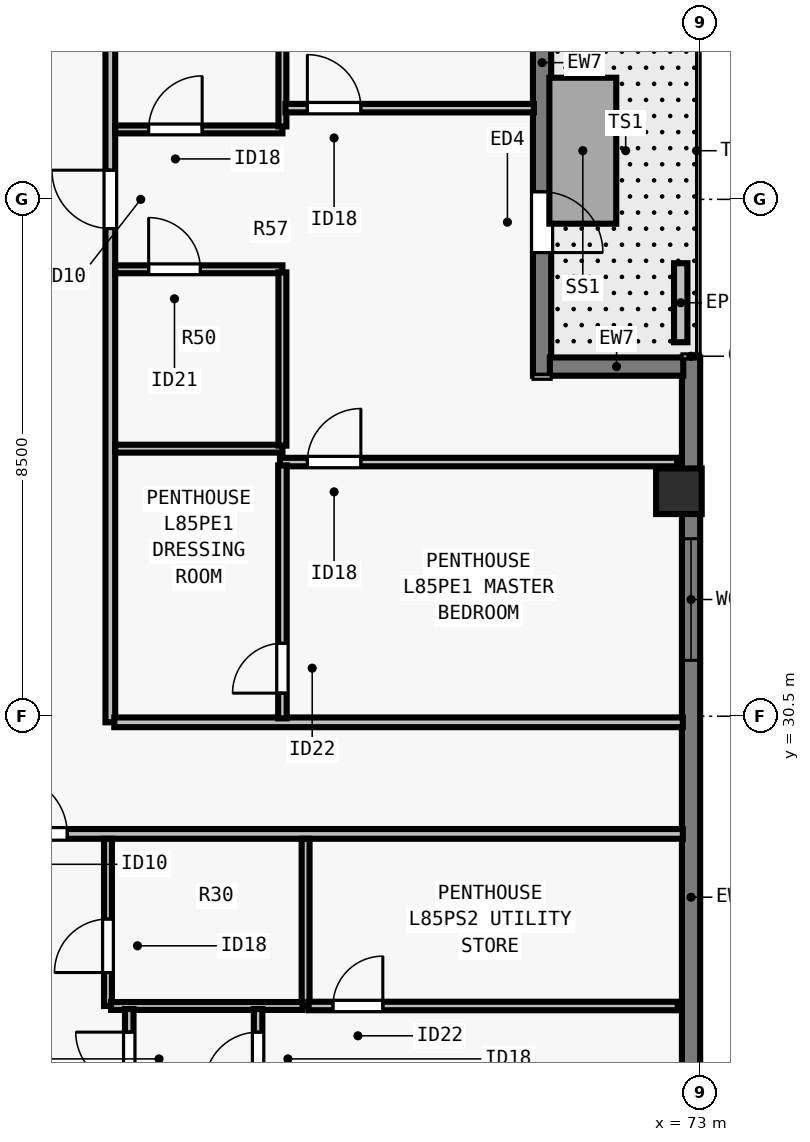
"""IFC4 building model, lengths in metres.
Left out: names, types, materials, properties, quantities, classifications, styles, units other than length and angle.
Written with IfcOpenShell. Run it as: python <this file> out.ifc"""

import sys

from ifc_helpers import new_model, si_unit, direction, frame, frame_2d, origin, origin_2d, place, context, subcontext, project, spatial, rectangle, extrude, element, fill, save


model = new_model("IFC4")
c1 = context("Model", 3, precision=1e-05, world=origin(), true_north=direction((0.0, 1.0)))
c2 = subcontext(c1, "Body", "Model", "MODEL_VIEW")
j1 = project(units=[si_unit("LENGTHUNIT", "METRE"), si_unit("PLANEANGLEUNIT", "RADIAN")], contexts=[c1])
p1 = place(None, origin())
s1 = spatial("IfcSite", under=j1, at=p1, CompositionType="ELEMENT")
p2 = place(p1, origin())
s2 = spatial("IfcBuilding", under=s1, at=p2, CompositionType="ELEMENT")
p3 = place(p2, frame((0.0, 0.0, 308.5)))
s3 = spatial("IfcBuildingStorey", under=s2, at=p3, CompositionType="ELEMENT", Elevation=308.5)
p4 = place(p3, frame((72.65, 34.2, 0.0), z_axis=(0.0, 0.0, 1.0), x_axis=(0.0, 1.0, 0.0)))
e1 = element("IfcColumn", 1, at=p4, inside=s3, PredefinedType="COLUMN", context=c2, shape_type="SweptSolid", body=[
    extrude(rectangle(XDim=0.75, YDim=0.75, at=origin_2d()), origin(), (0.0, 0.0, 1.0), 3.5),
])
p5 = place(p3, frame((72.85, 36.4, 0.0), z_axis=(0.0, 0.0, 1.0), x_axis=(0.0, -1.0, 0.0)))
e2 = element("IfcWall", 2, at=p5, inside=s3, PredefinedType="SOLIDWALL", context=c2, shape_type="SweptSolid", body=[
    extrude(rectangle(XDim=12.622, YDim=0.3, at=frame_2d((6.311, 0.0))), origin(), (0.0, 0.0, 1.0), 3.29),
])
p6 = place(p5, frame((2.98, 0.0, 0.8)))
e3 = element("IfcOpeningElement", 3, at=p6, cuts=e2, PredefinedType="OPENING", context=c2, shape_type="SweptSolid", body=[
    extrude(rectangle(XDim=2.0, YDim=1.758, at=frame_2d((1.0, 0.879))), frame((0.0, 0.16, 0.0), z_axis=(0.0, -1.0, 0.0), x_axis=(1.0, 0.0, 0.0)), (0.0, 0.0, 1.0), 0.32),
])
p7 = place(p3, frame((70.4, 43.222, 0.0), z_axis=(0.0, 0.0, 1.0), x_axis=(0.0, -1.0, 0.0)))
e4 = element("IfcWall", 4, at=p7, inside=s3, PredefinedType="SOLIDWALL", context=c2, shape_type="SweptSolid", body=[
    extrude(rectangle(XDim=7.122, YDim=0.3, at=frame_2d((3.561, 0.0))), origin(), (0.0, 0.0, 1.0), 3.29),
])
p8 = place(p7, frame((4.097, 0.0, 0.0)))
e5 = element("IfcOpeningElement", 5, at=p8, cuts=e4, PredefinedType="OPENING", context=c2, shape_type="SweptSolid", body=[
    extrude(rectangle(XDim=1.0, YDim=2.15, at=frame_2d((0.5, 1.075))), frame((0.0, 0.16, 0.0), z_axis=(0.0, -1.0, 0.0), x_axis=(1.0, 0.0, 0.0)), (0.0, 0.0, 1.0), 0.32),
])
p9 = place(p3, frame((70.528, 36.25, 0.0), z_axis=(0.0, 0.0, 1.0), x_axis=(1.0, 0.0, 0.0)))
e6 = element("IfcWall", 6, at=p9, inside=s3, PredefinedType="SOLIDWALL", context=c2, shape_type="SweptSolid", body=[
    extrude(rectangle(XDim=2.194, YDim=0.3, at=frame_2d((1.097, 0.0))), origin(), (0.0, 0.0, 1.0), 3.29),
])
p10 = place(p3, frame((72.68, 36.65, 0.0), z_axis=(0.0, 0.0, 1.0), x_axis=(0.0, 1.0, 0.0)))
e7 = element("IfcWall", 7, at=p10, inside=s3, PredefinedType="PARAPET", context=c2, shape_type="SweptSolid", body=[
    extrude(rectangle(XDim=1.3, YDim=0.22, at=frame_2d((0.65, 0.0))), origin(), (0.0, 0.0, 1.0), 0.55),
])
p11 = place(p3, frame((31.285, 28.565, 0.0), z_axis=(0.0, 0.0, 1.0), x_axis=(1.0, 0.0, 0.0)))
e8 = element("IfcWall", 8, at=p11, inside=s3, PredefinedType="PARTITIONING", context=c2, shape_type="SweptSolid", body=[
    extrude(rectangle(XDim=41.43, YDim=0.16, at=frame_2d((20.715, 0.0))), origin(), (0.0, 0.0, 1.0), 3.009),
])
p12 = place(p11, frame((9.766, 0.0, 0.0)))
e9 = element("IfcOpeningElement", 9, at=p12, cuts=e8, PredefinedType="OPENING", context=c2, shape_type="SweptSolid", body=[
    extrude(rectangle(XDim=0.96, YDim=2.18, at=frame_2d((0.48, 1.09))), frame((0.0, 0.09, 0.0), z_axis=(0.0, -1.0, 0.0), x_axis=(1.0, 0.0, 0.0)), (0.0, 0.0, 1.0), 0.18),
])
p13 = place(p11, frame((30.346, 0.0, 0.0)))
e10 = element("IfcOpeningElement", 10, at=p13, cuts=e8, PredefinedType="OPENING", context=c2, shape_type="SweptSolid", body=[
    extrude(rectangle(XDim=0.96, YDim=2.18, at=frame_2d((0.48, 1.09))), frame((0.0, 0.09, 0.0), z_axis=(0.0, -1.0, 0.0), x_axis=(1.0, 0.0, 0.0)), (0.0, 0.0, 1.0), 0.18),
])
p14 = place(p3, frame((63.3, 30.4, 0.0), z_axis=(0.0, 0.0, 1.0), x_axis=(0.0, 1.0, 0.0)))
e11 = element("IfcWall", 11, at=p14, inside=s3, PredefinedType="PARTITIONING", context=c2, shape_type="SweptSolid", body=[
    extrude(rectangle(XDim=17.2, YDim=0.16, at=frame_2d((8.6, 0.0))), origin(), (0.0, 0.0, 1.0), 3.29),
])
p15 = place(p14, frame((8.12, 0.0, 0.0)))
e12 = element("IfcOpeningElement", 12, at=p15, cuts=e11, PredefinedType="OPENING", context=c2, shape_type="SweptSolid", body=[
    extrude(rectangle(XDim=0.96, YDim=2.18, at=frame_2d((0.48, 1.09))), frame((0.0, 0.09, 0.0), z_axis=(0.0, -1.0, 0.0), x_axis=(1.0, 0.0, 0.0)), (0.0, 0.0, 1.0), 0.18),
])
p16 = place(p3, frame((63.365, 30.4, 0.0), z_axis=(0.0, 0.0, 1.0), x_axis=(1.0, 0.0, 0.0)))
e13 = element("IfcWall", 13, at=p16, inside=s3, PredefinedType="PARTITIONING", context=c2, shape_type="SweptSolid", body=[
    extrude(rectangle(XDim=9.35, YDim=0.16, at=frame_2d((4.675, 0.0))), origin(), (0.0, 0.0, 1.0), 3.29),
])
p17 = place(p3, frame((66.511, 25.735, 0.0), z_axis=(0.0, 0.0, 1.0), x_axis=(0.0, 1.0, 0.0)))
e14 = element("IfcWall", 14, at=p17, inside=s3, PredefinedType="PLUMBINGWALL", context=c2, shape_type="SweptSolid", body=[
    extrude(rectangle(XDim=2.75, YDim=0.13, at=frame_2d((1.375, 0.0))), origin(), (0.0, 0.0, 1.0), 3.29),
])
p18 = place(p3, frame((63.261, 25.735, 0.0), z_axis=(0.0, 0.0, 1.0), x_axis=(0.0, 1.0, 0.0)))
e15 = element("IfcWall", 15, at=p18, inside=s3, PredefinedType="PLUMBINGWALL", context=c2, shape_type="SweptSolid", body=[
    extrude(rectangle(XDim=2.75, YDim=0.13, at=frame_2d((1.375, 0.0))), origin(), (0.0, 0.0, 1.0), 3.29),
])
p19 = place(p18, frame((0.55, 0.0, 0.0)))
e16 = element("IfcOpeningElement", 16, at=p19, cuts=e15, PredefinedType="OPENING", context=c2, shape_type="SweptSolid", body=[
    extrude(rectangle(XDim=0.88, YDim=2.1, at=frame_2d((0.44, 1.05))), frame((0.0, 0.075, 0.0), z_axis=(0.0, -1.0, 0.0), x_axis=(1.0, 0.0, 0.0)), (0.0, 0.0, 1.0), 0.15),
])
p20 = place(p3, frame((63.311, 25.735, 0.0), z_axis=(0.0, 0.0, 1.0), x_axis=(1.0, 0.0, 0.0)))
e17 = element("IfcWall", 17, at=p20, inside=s3, PredefinedType="PLUMBINGWALL", context=c2, shape_type="SweptSolid", body=[
    extrude(rectangle(XDim=3.15, YDim=0.13, at=frame_2d((1.575, 0.0))), origin(), (0.0, 0.0, 1.0), 3.29),
])
p21 = place(p3, frame((65.73, 18.38, 0.0), z_axis=(0.0, 0.0, 1.0), x_axis=(0.0, 1.0, 0.0)))
e18 = element("IfcWall", 18, at=p21, inside=s3, PredefinedType="PARTITIONING", context=c2, shape_type="SweptSolid", body=[
    extrude(rectangle(XDim=7.305, YDim=0.14, at=frame_2d((3.653, 0.0))), origin(), (0.0, 0.0, 1.0), 2.653),
])
p22 = place(p21, frame((6.045, 0.0, 0.0)))
e19 = element("IfcOpeningElement", 19, at=p22, cuts=e18, PredefinedType="OPENING", context=c2, shape_type="SweptSolid", body=[
    extrude(rectangle(XDim=0.88, YDim=2.1, at=frame_2d((0.44, 1.05))), frame((0.0, 0.08, 0.0), z_axis=(0.0, -1.0, 0.0), x_axis=(1.0, 0.0, 0.0)), (0.0, 0.0, 1.0), 0.16),
])
p23 = place(p3, frame((66.561, 25.735, 0.0), z_axis=(0.0, 0.0, 1.0), x_axis=(1.0, 0.0, 0.0)))
e20 = element("IfcWall", 20, at=p23, inside=s3, PredefinedType="PARTITIONING", context=c2, shape_type="SweptSolid", body=[
    extrude(rectangle(XDim=6.069, YDim=0.14, at=frame_2d((3.034, 0.0))), origin(), (0.0, 0.0, 1.0), 3.009),
])
p24 = place(p23, frame((0.4, 0.0, 0.0)))
e21 = element("IfcOpeningElement", 21, at=p24, cuts=e20, PredefinedType="OPENING", context=c2, shape_type="SweptSolid", body=[
    extrude(rectangle(XDim=0.82, YDim=2.1, at=frame_2d((0.41, 1.05))), frame((0.0, 0.08, 0.0), z_axis=(0.0, -1.0, 0.0), x_axis=(1.0, 0.0, 0.0)), (0.0, 0.0, 1.0), 0.16),
])
p25 = place(p3, frame((63.611, 18.38, 0.0), z_axis=(0.0, 0.0, 1.0), x_axis=(0.0, 1.0, 0.0)))
e22 = element("IfcWall", 22, at=p25, inside=s3, PredefinedType="PARTITIONING", context=c2, shape_type="SweptSolid", body=[
    extrude(rectangle(XDim=7.305, YDim=0.14, at=frame_2d((3.653, 0.0))), origin(), (0.0, 0.0, 1.0), 2.653),
])
p26 = place(p25, frame((6.045, 0.0, 0.0)))
e23 = element("IfcOpeningElement", 23, at=p26, cuts=e22, PredefinedType="OPENING", context=c2, shape_type="SweptSolid", body=[
    extrude(rectangle(XDim=0.88, YDim=2.1, at=frame_2d((0.44, 1.05))), frame((0.0, 0.08, 0.0), z_axis=(0.0, -1.0, 0.0), x_axis=(1.0, 0.0, 0.0)), (0.0, 0.0, 1.0), 0.16),
])
p27 = place(p3, frame((63.38, 34.9, 0.0), z_axis=(0.0, 0.0, 1.0), x_axis=(1.0, 0.0, 0.0)))
e24 = element("IfcWall", 24, at=p27, inside=s3, PredefinedType="PLUMBINGWALL", context=c2, shape_type="SweptSolid", body=[
    extrude(rectangle(XDim=2.75, YDim=0.13, at=frame_2d((1.375, 0.0))), origin(), (0.0, 0.0, 1.0), 3.29),
])
p28 = place(p3, frame((63.38, 37.85, 0.0), z_axis=(0.0, 0.0, 1.0), x_axis=(1.0, 0.0, 0.0)))
e25 = element("IfcWall", 25, at=p28, inside=s3, PredefinedType="PLUMBINGWALL", context=c2, shape_type="SweptSolid", body=[
    extrude(rectangle(XDim=2.75, YDim=0.13, at=frame_2d((1.375, 0.0))), origin(), (0.0, 0.0, 1.0), 3.29),
])
p29 = place(p28, frame((0.55, 0.0, 0.0)))
e26 = element("IfcOpeningElement", 26, at=p29, cuts=e25, PredefinedType="OPENING", context=c2, shape_type="SweptSolid", body=[
    extrude(rectangle(XDim=0.85, YDim=2.08, at=frame_2d((0.425, 1.04))), frame((0.0, 0.075, 0.0), z_axis=(0.0, -1.0, 0.0), x_axis=(1.0, 0.0, 0.0)), (0.0, 0.0, 1.0), 0.15),
])
p30 = place(p3, frame((66.13, 34.95, 0.0), z_axis=(0.0, 0.0, 1.0), x_axis=(0.0, 1.0, 0.0)))
e27 = element("IfcWall", 27, at=p30, inside=s3, PredefinedType="PLUMBINGWALL", context=c2, shape_type="SweptSolid", body=[
    extrude(rectangle(XDim=2.85, YDim=0.13, at=frame_2d((1.425, 0.0))), origin(), (0.0, 0.0, 1.0), 3.29),
])
p31 = place(p3, frame((63.38, 40.15, 0.0), z_axis=(0.0, 0.0, 1.0), x_axis=(1.0, 0.0, 0.0)))
e28 = element("IfcWall", 28, at=p31, inside=s3, PredefinedType="PLUMBINGWALL", context=c2, shape_type="SweptSolid", body=[
    extrude(rectangle(XDim=2.75, YDim=0.13, at=frame_2d((1.375, 0.0))), origin(), (0.0, 0.0, 1.0), 3.29),
])
p32 = place(p31, frame((0.55, 0.0, 0.0)))
e29 = element("IfcOpeningElement", 29, at=p32, cuts=e28, PredefinedType="OPENING", context=c2, shape_type="SweptSolid", body=[
    extrude(rectangle(XDim=0.88, YDim=2.1, at=frame_2d((0.44, 1.05))), frame((0.0, 0.075, 0.0), z_axis=(0.0, -1.0, 0.0), x_axis=(1.0, 0.0, 0.0)), (0.0, 0.0, 1.0), 0.15),
])
p33 = place(p3, frame((66.13, 40.2, 0.0), z_axis=(0.0, 0.0, 1.0), x_axis=(0.0, 1.0, 0.0)))
e30 = element("IfcWall", 30, at=p33, inside=s3, PredefinedType="PLUMBINGWALL", context=c2, shape_type="SweptSolid", body=[
    extrude(rectangle(XDim=3.15, YDim=0.13, at=frame_2d((1.575, 0.0))), origin(), (0.0, 0.0, 1.0), 3.29),
])
p34 = place(p3, frame((66.09, 34.68, 0.0), z_axis=(0.0, 0.0, 1.0), x_axis=(1.0, 0.0, 0.0)))
e31 = element("IfcWall", 31, at=p34, inside=s3, PredefinedType="PARTITIONING", context=c2, shape_type="SweptSolid", body=[
    extrude(rectangle(XDim=6.53, YDim=0.14, at=frame_2d((3.265, 0.0))), origin(), (0.0, 0.0, 1.0), 3.29),
])
p35 = place(p34, frame((0.45, 0.0, 0.0)))
e32 = element("IfcOpeningElement", 32, at=p35, cuts=e31, PredefinedType="OPENING", context=c2, shape_type="SweptSolid", body=[
    extrude(rectangle(XDim=0.88, YDim=2.1, at=frame_2d((0.44, 1.05))), frame((0.0, 0.08, 0.0), z_axis=(0.0, -1.0, 0.0), x_axis=(1.0, 0.0, 0.0)), (0.0, 0.0, 1.0), 0.16),
])
p36 = place(p3, frame((66.13, 30.465, 0.0), z_axis=(0.0, 0.0, 1.0), x_axis=(0.0, 1.0, 0.0)))
e33 = element("IfcWall", 33, at=p36, inside=s3, PredefinedType="PARTITIONING", context=c2, shape_type="SweptSolid", body=[
    extrude(rectangle(XDim=4.16, YDim=0.14, at=frame_2d((2.08, 0.0))), origin(), (0.0, 0.0, 1.0), 3.29),
])
p37 = place(p36, frame((0.415, 0.0, 0.0)))
e34 = element("IfcOpeningElement", 34, at=p37, cuts=e33, PredefinedType="OPENING", context=c2, shape_type="SweptSolid", body=[
    extrude(rectangle(XDim=0.82, YDim=2.1, at=frame_2d((0.41, 1.05))), frame((0.0, 0.08, 0.0), z_axis=(0.0, -1.0, 0.0), x_axis=(1.0, 0.0, 0.0)), (0.0, 0.0, 1.0), 0.16),
])
p38 = place(p3, frame((66.18, 40.5, 0.0), z_axis=(0.0, 0.0, 1.0), x_axis=(1.0, 0.0, 0.0)))
e35 = element("IfcWall", 35, at=p38, inside=s3, PredefinedType="PARTITIONING", context=c2, shape_type="SweptSolid", body=[
    extrude(rectangle(XDim=4.085, YDim=0.14, at=frame_2d((2.042, 0.0))), origin(), (0.0, 0.0, 1.0), 3.29),
])
p39 = place(p38, frame((0.36, 0.0, 0.0)))
e36 = element("IfcOpeningElement", 36, at=p39, cuts=e35, PredefinedType="OPENING", context=c2, shape_type="SweptSolid", body=[
    extrude(rectangle(XDim=0.88, YDim=2.1, at=frame_2d((0.44, 1.05))), frame((0.0, 0.08, 0.0), z_axis=(0.0, -1.0, 0.0), x_axis=(1.0, 0.0, 0.0)), (0.0, 0.0, 1.0), 0.16),
])
p40 = place(p6, origin())
e37 = element("IfcWindow", 37, at=p40, inside=s3, PartitioningType="SINGLE_PANEL", PredefinedType="WINDOW", context=c2, shape_type="SweptSolid", body=[
    extrude(rectangle(XDim=2.0, YDim=1.758, at=frame_2d((1.0, 0.879))), frame((0.0, -0.05, 0.0), z_axis=(0.0, -1.0, 0.0), x_axis=(1.0, 0.0, 0.0)), (0.0, 0.0, 1.0), 0.06),
])
fill(e3, e37)
p41 = place(p8, origin())
e38 = element("IfcDoor", 38, at=p41, inside=s3, OperationType="SINGLE_SWING_RIGHT", PredefinedType="DOOR", context=c2, shape_type="SweptSolid", body=[
    extrude(rectangle(XDim=1.0, YDim=2.15, at=frame_2d((0.5, 1.075))), frame((0.0, 0.025, 0.0), z_axis=(0.0, -1.0, 0.0), x_axis=(1.0, 0.0, 0.0)), (0.0, 0.0, 1.0), 0.05),
])
fill(e5, e38)
p42 = place(p19, origin())
e39 = element("IfcDoor", 39, at=p42, inside=s3, OperationType="SINGLE_SWING_LEFT", PredefinedType="DOOR", context=c2, shape_type="SweptSolid", body=[
    extrude(rectangle(XDim=0.88, YDim=2.1, at=frame_2d((0.44, 1.05))), frame((0.0, 0.025, 0.0), z_axis=(0.0, -1.0, 0.0), x_axis=(1.0, 0.0, 0.0)), (0.0, 0.0, 1.0), 0.05),
])
fill(e16, e39)
p43 = place(p24, origin())
e40 = element("IfcDoor", 40, at=p43, inside=s3, OperationType="SINGLE_SWING_RIGHT", PredefinedType="DOOR", context=c2, shape_type="SweptSolid", body=[
    extrude(rectangle(XDim=0.82, YDim=2.1, at=frame_2d((0.41, 1.05))), frame((0.0, 0.025, 0.0), z_axis=(0.0, -1.0, 0.0), x_axis=(1.0, 0.0, 0.0)), (0.0, 0.0, 1.0), 0.05),
])
fill(e21, e40)
p44 = place(p22, origin())
e41 = element("IfcDoor", 41, at=p44, inside=s3, OperationType="SINGLE_SWING_LEFT", PredefinedType="DOOR", context=c2, shape_type="SweptSolid", body=[
    extrude(rectangle(XDim=0.88, YDim=2.1, at=frame_2d((0.44, 1.05))), frame((0.0, 0.025, 0.0), z_axis=(0.0, -1.0, 0.0), x_axis=(1.0, 0.0, 0.0)), (0.0, 0.0, 1.0), 0.05),
])
fill(e19, e41)
p45 = place(p26, origin())
e42 = element("IfcDoor", 42, at=p45, inside=s3, OperationType="SINGLE_SWING_RIGHT", PredefinedType="DOOR", context=c2, shape_type="SweptSolid", body=[
    extrude(rectangle(XDim=0.88, YDim=2.1, at=frame_2d((0.44, 1.05))), frame((0.0, 0.025, 0.0), z_axis=(0.0, -1.0, 0.0), x_axis=(1.0, 0.0, 0.0)), (0.0, 0.0, 1.0), 0.05),
])
fill(e23, e42)
p46 = place(p13, origin())
e43 = element("IfcDoor", 43, at=p46, inside=s3, OperationType="SINGLE_SWING_LEFT", PredefinedType="DOOR", context=c2, shape_type="SweptSolid", body=[
    extrude(rectangle(XDim=0.96, YDim=2.18, at=frame_2d((0.48, 1.09))), frame((0.0, 0.025, 0.0), z_axis=(0.0, -1.0, 0.0), x_axis=(1.0, 0.0, 0.0)), (0.0, 0.0, 1.0), 0.05),
])
fill(e10, e43)
p47 = place(p29, origin())
e44 = element("IfcDoor", 44, at=p47, inside=s3, OperationType="SINGLE_SWING_LEFT", PredefinedType="DOOR", context=c2, shape_type="SweptSolid", body=[
    extrude(rectangle(XDim=0.85, YDim=2.08, at=frame_2d((0.425, 1.04))), frame((0.0, 0.025, 0.0), z_axis=(0.0, -1.0, 0.0), x_axis=(1.0, 0.0, 0.0)), (0.0, 0.0, 1.0), 0.05),
])
fill(e26, e44)
p48 = place(p32, origin())
e45 = element("IfcDoor", 45, at=p48, inside=s3, OperationType="SINGLE_SWING_RIGHT", PredefinedType="DOOR", context=c2, shape_type="SweptSolid", body=[
    extrude(rectangle(XDim=0.88, YDim=2.1, at=frame_2d((0.44, 1.05))), frame((0.0, 0.025, 0.0), z_axis=(0.0, -1.0, 0.0), x_axis=(1.0, 0.0, 0.0)), (0.0, 0.0, 1.0), 0.05),
])
fill(e29, e45)
p49 = place(p37, origin())
e46 = element("IfcDoor", 46, at=p49, inside=s3, OperationType="SINGLE_SWING_LEFT", PredefinedType="DOOR", context=c2, shape_type="SweptSolid", body=[
    extrude(rectangle(XDim=0.82, YDim=2.1, at=frame_2d((0.41, 1.05))), frame((0.0, 0.025, 0.0), z_axis=(0.0, -1.0, 0.0), x_axis=(1.0, 0.0, 0.0)), (0.0, 0.0, 1.0), 0.05),
])
fill(e34, e46)
p50 = place(p35, origin())
e47 = element("IfcDoor", 47, at=p50, inside=s3, OperationType="SINGLE_SWING_RIGHT", PredefinedType="DOOR", context=c2, shape_type="SweptSolid", body=[
    extrude(rectangle(XDim=0.88, YDim=2.1, at=frame_2d((0.44, 1.05))), frame((0.0, 0.025, 0.0), z_axis=(0.0, -1.0, 0.0), x_axis=(1.0, 0.0, 0.0)), (0.0, 0.0, 1.0), 0.05),
])
fill(e32, e47)
p51 = place(p39, origin())
e48 = element("IfcDoor", 48, at=p51, inside=s3, OperationType="SINGLE_SWING_LEFT", PredefinedType="DOOR", context=c2, shape_type="SweptSolid", body=[
    extrude(rectangle(XDim=0.88, YDim=2.1, at=frame_2d((0.44, 1.05))), frame((0.0, 0.025, 0.0), z_axis=(0.0, -1.0, 0.0), x_axis=(1.0, 0.0, 0.0)), (0.0, 0.0, 1.0), 0.05),
])
fill(e36, e48)
p52 = place(p15, origin())
e49 = element("IfcDoor", 49, at=p52, inside=s3, OperationType="SINGLE_SWING_RIGHT", PredefinedType="DOOR", context=c2, shape_type="SweptSolid", body=[
    extrude(rectangle(XDim=0.96, YDim=2.18, at=frame_2d((0.48, 1.09))), frame((0.0, 0.025, 0.0), z_axis=(0.0, -1.0, 0.0), x_axis=(1.0, 0.0, 0.0)), (0.0, 0.0, 1.0), 0.05),
])
fill(e12, e49)
save(model, sys.argv[1])
